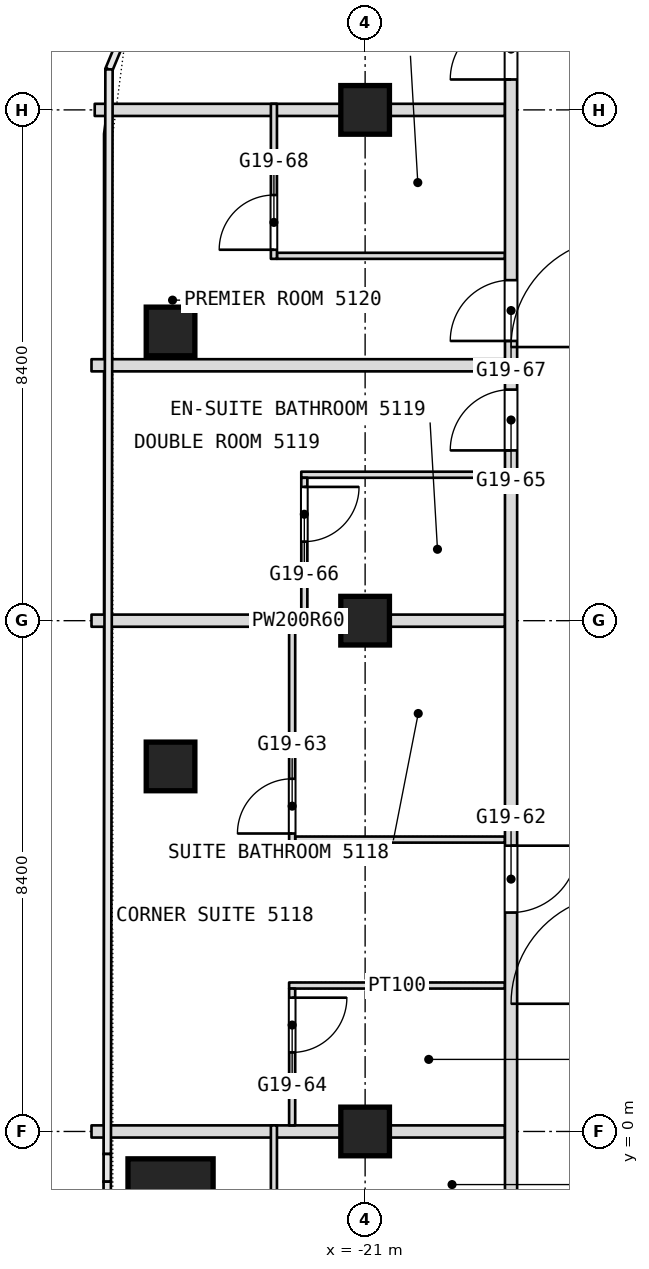
"""IFC4 building model, lengths in metres.
Left out: names, types, materials, properties, quantities, classifications, styles, units other than length and angle.
Written with IfcOpenShell. Run it as: python <this file> out.ifc"""

import sys

from ifc_helpers import new_model, si_unit, direction, frame, frame_2d, origin, origin_2d, place, context, subcontext, project, spatial, rectangle, extrude, element, fill, save


model = new_model("IFC4")
c1 = context("Model", 3, precision=1e-05, world=origin(), true_north=direction((0.0, 1.0)))
c2 = subcontext(c1, "Body", "Model", "MODEL_VIEW")
j1 = project(units=[si_unit("LENGTHUNIT", "METRE"), si_unit("PLANEANGLEUNIT", "RADIAN")], contexts=[c1])
p1 = place(None, origin())
s1 = spatial("IfcSite", under=j1, at=p1, CompositionType="ELEMENT")
p2 = place(p1, origin())
s2 = spatial("IfcBuilding", under=s1, at=p2, CompositionType="ELEMENT")
p3 = place(p2, frame((0.0, 0.0, 220.1)))
s3 = spatial("IfcBuildingStorey", under=s2, at=p3, CompositionType="ELEMENT", Elevation=220.1)
p4 = place(p3, frame((-24.2, -1.15, 0.0), z_axis=(0.0, 0.0, 1.0), x_axis=(1.0, 0.0, 0.0)))
e1 = element("IfcColumn", 1, at=p4, inside=s3, PredefinedType="COLUMN", context=c2, shape_type="SweptSolid", body=[
    extrude(rectangle(XDim=1.4, YDim=1.4, at=origin_2d()), origin(), (0.0, 0.0, 1.0), 3.6),
])
for number, where, z_axis, x_axis in (
    (2, (-21.0, 0.0, 0.0), (0.0, 0.0, 1.0), (1.0, 0.0, 0.0)),
    (3, (-21.0, 8.4, 0.0), (0.0, 0.0, 1.0), (1.0, 0.0, 0.0)),
    (4, (-21.0, 16.8, 0.0), (0.0, 0.0, 1.0), (1.0, 0.0, 0.0)),
    (5, (-24.2, 6.003, 0.0), (0.0, 0.0, 1.0), (1.0, 0.0, 0.0)),
    (6, (-24.2, 13.156, 0.0), (0.0, 0.0, 1.0), (1.0, 0.0, 0.0)),
):
    element("IfcColumn", number, at=place(p3, frame(where, z_axis=z_axis, x_axis=x_axis)), inside=s3, PredefinedType="COLUMN", context=c2, shape_type="SweptSolid", body=[
        extrude(rectangle(XDim=0.8, YDim=0.8, at=origin_2d()), origin(), (0.0, 0.0, 1.0), 3.6),
    ])
p5 = place(p3, frame((-25.5, 0.0, 0.0), z_axis=(0.0, 0.0, 1.0), x_axis=(1.0, 0.0, 0.0)))
e7 = element("IfcWall", 7, at=p5, inside=s3, PredefinedType="PARTITIONING", context=c2, shape_type="SweptSolid", body=[
    extrude(rectangle(XDim=6.8, YDim=0.2, at=frame_2d((3.4, 0.0))), origin(), (0.0, 0.0, 1.0), 2.94),
])
p6 = place(p3, frame((-22.25, 2.4, 0.0), z_axis=(0.0, 0.0, 1.0), x_axis=(1.0, 0.0, 0.0)))
e8 = element("IfcWall", 8, at=p6, inside=s3, PredefinedType="PARTITIONING", context=c2, shape_type="SweptSolid", body=[
    extrude(rectangle(XDim=3.55, YDim=0.1, at=frame_2d((1.775, 0.0))), origin(), (0.0, 0.0, 1.0), 3.34),
])
p7 = place(p3, frame((-22.15, 4.8, 0.0), z_axis=(0.0, 0.0, 1.0), x_axis=(1.0, 0.0, 0.0)))
e9 = element("IfcWall", 9, at=p7, inside=s3, PredefinedType="PARTITIONING", context=c2, shape_type="SweptSolid", body=[
    extrude(rectangle(XDim=3.45, YDim=0.1, at=frame_2d((1.725, 0.0))), origin(), (0.0, 0.0, 1.0), 3.34),
])
p8 = place(p3, frame((-25.5, 8.4, 0.0), z_axis=(0.0, 0.0, 1.0), x_axis=(1.0, 0.0, 0.0)))
e10 = element("IfcWall", 10, at=p8, inside=s3, PredefinedType="PARTITIONING", context=c2, shape_type="SweptSolid", body=[
    extrude(rectangle(XDim=6.8, YDim=0.2, at=frame_2d((3.4, 0.0))), origin(), (0.0, 0.0, 1.0), 2.94),
])
p9 = place(p3, frame((-22.05, 10.8, 0.0), z_axis=(0.0, 0.0, 1.0), x_axis=(1.0, 0.0, 0.0)))
e11 = element("IfcWall", 11, at=p9, inside=s3, PredefinedType="PARTITIONING", context=c2, shape_type="SweptSolid", body=[
    extrude(rectangle(XDim=3.35, YDim=0.1, at=frame_2d((1.675, 0.0))), origin(), (0.0, 0.0, 1.0), 3.34),
])
p10 = place(p3, frame((-25.5, 12.6, 0.0), z_axis=(0.0, 0.0, 1.0), x_axis=(1.0, 0.0, 0.0)))
e12 = element("IfcWall", 12, at=p10, inside=s3, PredefinedType="PARTITIONING", context=c2, shape_type="SweptSolid", body=[
    extrude(rectangle(XDim=6.8, YDim=0.2, at=frame_2d((3.4, 0.0))), origin(), (0.0, 0.0, 1.0), 3.34),
])
p11 = place(p3, frame((-22.45, 14.4, 0.0), z_axis=(0.0, 0.0, 1.0), x_axis=(1.0, 0.0, 0.0)))
e13 = element("IfcWall", 13, at=p11, inside=s3, PredefinedType="PARTITIONING", context=c2, shape_type="SweptSolid", body=[
    extrude(rectangle(XDim=3.75, YDim=0.1, at=frame_2d((1.875, 0.0))), origin(), (0.0, 0.0, 1.0), 3.34),
])
p12 = place(p3, frame((-25.447, 16.8, 0.0), z_axis=(0.0, 0.0, 1.0), x_axis=(1.0, 0.0, 0.0)))
e14 = element("IfcWall", 14, at=p12, inside=s3, PredefinedType="PARTITIONING", context=c2, shape_type="SweptSolid", body=[
    extrude(rectangle(XDim=6.747, YDim=0.2, at=frame_2d((3.374, 0.0))), origin(), (0.0, 0.0, 1.0), 2.94),
])
p13 = place(p3, frame((-18.6, -26.751, 0.0), z_axis=(0.0, 0.0, 1.0), x_axis=(0.0, 1.0, 0.0)))
e15 = element("IfcWall", 15, at=p13, inside=s3, PredefinedType="PARTITIONING", context=c2, shape_type="SweptSolid", body=[
    extrude(rectangle(XDim=49.091, YDim=0.2, at=frame_2d((24.545, 0.0))), origin(), (0.0, 0.0, 1.0), 3.34),
])
p14 = place(p13, frame((3.413, 0.0, 0.0)))
e16 = element("IfcOpeningElement", 16, at=p14, cuts=e15, PredefinedType="OPENING", context=c2, shape_type="SweptSolid", body=[
    extrude(rectangle(XDim=1.0, YDim=2.1, at=frame_2d((0.5, 1.05))), frame((0.0, 0.1, 0.0), z_axis=(0.0, -1.0, 0.0), x_axis=(1.0, 0.0, 0.0)), (0.0, 0.0, 1.0), 0.2),
])
p15 = place(p13, frame((5.838, 0.0, 0.0)))
e17 = element("IfcOpeningElement", 17, at=p15, cuts=e15, PredefinedType="OPENING", context=c2, shape_type="SweptSolid", body=[
    extrude(rectangle(XDim=1.0, YDim=2.1, at=frame_2d((0.5, 1.05))), frame((0.0, 0.1, 0.0), z_axis=(0.0, -1.0, 0.0), x_axis=(1.0, 0.0, 0.0)), (0.0, 0.0, 1.0), 0.2),
])
p16 = place(p13, frame((10.351, 0.0, 0.0)))
e18 = element("IfcOpeningElement", 18, at=p16, cuts=e15, PredefinedType="OPENING", context=c2, shape_type="SweptSolid", body=[
    extrude(rectangle(XDim=1.0, YDim=2.1, at=frame_2d((0.5, 1.05))), frame((0.0, 0.1, 0.0), z_axis=(0.0, -1.0, 0.0), x_axis=(1.0, 0.0, 0.0)), (0.0, 0.0, 1.0), 0.2),
])
p17 = place(p13, frame((16.951, 0.0, 0.0)))
e19 = element("IfcOpeningElement", 19, at=p17, cuts=e15, PredefinedType="OPENING", context=c2, shape_type="SweptSolid", body=[
    extrude(rectangle(XDim=1.0, YDim=2.1, at=frame_2d((0.5, 1.05))), frame((0.0, 0.1, 0.0), z_axis=(0.0, -1.0, 0.0), x_axis=(1.0, 0.0, 0.0)), (0.0, 0.0, 1.0), 0.2),
])
p18 = place(p13, frame((21.151, 0.0, 0.0)))
e20 = element("IfcOpeningElement", 20, at=p18, cuts=e15, PredefinedType="OPENING", context=c2, shape_type="SweptSolid", body=[
    extrude(rectangle(XDim=1.0, YDim=2.1, at=frame_2d((0.5, 1.05))), frame((0.0, 0.1, 0.0), z_axis=(0.0, -1.0, 0.0), x_axis=(1.0, 0.0, 0.0)), (0.0, 0.0, 1.0), 0.2),
])
p19 = place(p13, frame((22.951, 0.0, 0.0)))
e21 = element("IfcOpeningElement", 21, at=p19, cuts=e15, PredefinedType="OPENING", context=c2, shape_type="SweptSolid", body=[
    extrude(rectangle(XDim=1.0, YDim=2.1, at=frame_2d((0.5, 1.05))), frame((0.0, 0.1, 0.0), z_axis=(0.0, -1.0, 0.0), x_axis=(1.0, 0.0, 0.0)), (0.0, 0.0, 1.0), 0.2),
])
p20 = place(p13, frame((30.351, 0.0, 0.0)))
e22 = element("IfcOpeningElement", 22, at=p20, cuts=e15, PredefinedType="OPENING", context=c2, shape_type="SweptSolid", body=[
    extrude(rectangle(XDim=1.1, YDim=2.1, at=frame_2d((0.55, 1.05))), frame((0.0, 0.1, 0.0), z_axis=(0.0, -1.0, 0.0), x_axis=(1.0, 0.0, 0.0)), (0.0, 0.0, 1.0), 0.2),
])
p21 = place(p13, frame((37.951, 0.0, 0.0)))
e23 = element("IfcOpeningElement", 23, at=p21, cuts=e15, PredefinedType="OPENING", context=c2, shape_type="SweptSolid", body=[
    extrude(rectangle(XDim=1.0, YDim=2.1, at=frame_2d((0.5, 1.05))), frame((0.0, 0.1, 0.0), z_axis=(0.0, -1.0, 0.0), x_axis=(1.0, 0.0, 0.0)), (0.0, 0.0, 1.0), 0.2),
])
p22 = place(p13, frame((39.751, 0.0, 0.0)))
e24 = element("IfcOpeningElement", 24, at=p22, cuts=e15, PredefinedType="OPENING", context=c2, shape_type="SweptSolid", body=[
    extrude(rectangle(XDim=1.0, YDim=2.1, at=frame_2d((0.5, 1.05))), frame((0.0, 0.1, 0.0), z_axis=(0.0, -1.0, 0.0), x_axis=(1.0, 0.0, 0.0)), (0.0, 0.0, 1.0), 0.2),
])
p23 = place(p13, frame((44.051, 0.0, 0.0)))
e25 = element("IfcOpeningElement", 25, at=p23, cuts=e15, PredefinedType="OPENING", context=c2, shape_type="SweptSolid", body=[
    extrude(rectangle(XDim=1.0, YDim=2.1, at=frame_2d((0.5, 1.05))), frame((0.0, 0.1, 0.0), z_axis=(0.0, -1.0, 0.0), x_axis=(1.0, 0.0, 0.0)), (0.0, 0.0, 1.0), 0.2),
])
p24 = place(p3, frame((-22.0, 8.5, 0.0), z_axis=(0.0, 0.0, 1.0), x_axis=(0.0, 1.0, 0.0)))
e26 = element("IfcWall", 26, at=p24, inside=s3, PredefinedType="PARTITIONING", context=c2, shape_type="SweptSolid", body=[
    extrude(rectangle(XDim=2.25, YDim=0.1, at=frame_2d((1.125, 0.0))), origin(), (0.0, 0.0, 1.0), 3.34),
])
p25 = place(p24, frame((1.2, 0.0, 0.0)))
e27 = element("IfcOpeningElement", 27, at=p25, cuts=e26, PredefinedType="OPENING", context=c2, shape_type="SweptSolid", body=[
    extrude(rectangle(XDim=0.9, YDim=2.1, at=frame_2d((0.45, 1.05))), frame((0.0, 0.05, 0.0), z_axis=(0.0, -1.0, 0.0), x_axis=(1.0, 0.0, 0.0)), (0.0, 0.0, 1.0), 0.1),
])
p26 = place(p3, frame((-22.2, 0.1, 0.0), z_axis=(0.0, 0.0, 1.0), x_axis=(0.0, 1.0, 0.0)))
e28 = element("IfcWall", 28, at=p26, inside=s3, PredefinedType="PARTITIONING", context=c2, shape_type="SweptSolid", body=[
    extrude(rectangle(XDim=2.25, YDim=0.1, at=frame_2d((1.125, 0.0))), origin(), (0.0, 0.0, 1.0), 3.34),
])
p27 = place(p26, frame((1.2, 0.0, 0.0)))
e29 = element("IfcOpeningElement", 29, at=p27, cuts=e28, PredefinedType="OPENING", context=c2, shape_type="SweptSolid", body=[
    extrude(rectangle(XDim=0.9, YDim=2.1, at=frame_2d((0.45, 1.05))), frame((0.0, 0.05, 0.0), z_axis=(0.0, -1.0, 0.0), x_axis=(1.0, 0.0, 0.0)), (0.0, 0.0, 1.0), 0.1),
])
p28 = place(p3, frame((-22.2, 4.75, 0.0), z_axis=(0.0, 0.0, 1.0), x_axis=(0.0, 1.0, 0.0)))
e30 = element("IfcWall", 30, at=p28, inside=s3, PredefinedType="PARTITIONING", context=c2, shape_type="SweptSolid", body=[
    extrude(rectangle(XDim=3.75, YDim=0.1, at=frame_2d((1.875, 0.0))), origin(), (0.0, 0.0, 1.0), 3.34),
])
p29 = place(p28, frame((0.15, 0.0, 0.0)))
e31 = element("IfcOpeningElement", 31, at=p29, cuts=e30, PredefinedType="OPENING", context=c2, shape_type="SweptSolid", body=[
    extrude(rectangle(XDim=0.9, YDim=2.1, at=frame_2d((0.45, 1.05))), frame((0.0, 0.05, 0.0), z_axis=(0.0, -1.0, 0.0), x_axis=(1.0, 0.0, 0.0)), (0.0, 0.0, 1.0), 0.1),
])
p30 = place(p3, frame((-22.5, -2.45, 0.0), z_axis=(0.0, 0.0, 1.0), x_axis=(0.0, 1.0, 0.0)))
e32 = element("IfcWall", 32, at=p30, inside=s3, PredefinedType="PARTITIONING", context=c2, shape_type="SweptSolid", body=[
    extrude(rectangle(XDim=2.55, YDim=0.1, at=frame_2d((1.275, 0.0))), origin(), (0.0, 0.0, 1.0), 3.34),
])
p31 = place(p3, frame((-22.5, 14.35, 0.0), z_axis=(0.0, 0.0, 1.0), x_axis=(0.0, 1.0, 0.0)))
e33 = element("IfcWall", 33, at=p31, inside=s3, PredefinedType="PARTITIONING", context=c2, shape_type="SweptSolid", body=[
    extrude(rectangle(XDim=2.55, YDim=0.1, at=frame_2d((1.275, 0.0))), origin(), (0.0, 0.0, 1.0), 3.34),
])
p32 = place(p31, frame((0.15, 0.0, 0.0)))
e34 = element("IfcOpeningElement", 34, at=p32, cuts=e33, PredefinedType="OPENING", context=c2, shape_type="SweptSolid", body=[
    extrude(rectangle(XDim=0.9, YDim=2.1, at=frame_2d((0.45, 1.05))), frame((0.0, 0.05, 0.0), z_axis=(0.0, -1.0, 0.0), x_axis=(1.0, 0.0, 0.0)), (0.0, 0.0, 1.0), 0.1),
])
p33 = place(p20, origin())
e35 = element("IfcDoor", 35, at=p33, inside=s3, OperationType="SINGLE_SWING_RIGHT", PredefinedType="DOOR", context=c2, shape_type="SweptSolid", body=[
    extrude(rectangle(XDim=1.1, YDim=2.1, at=frame_2d((0.55, 1.05))), frame((0.0, 0.025, 0.0), z_axis=(0.0, -1.0, 0.0), x_axis=(1.0, 0.0, 0.0)), (0.0, 0.0, 1.0), 0.05),
])
fill(e22, e35)
p34 = place(p21, origin())
e36 = element("IfcDoor", 36, at=p34, inside=s3, OperationType="SINGLE_SWING_RIGHT", PredefinedType="DOOR", context=c2, shape_type="SweptSolid", body=[
    extrude(rectangle(XDim=1.0, YDim=2.1, at=frame_2d((0.5, 1.05))), frame((0.0, 0.025, 0.0), z_axis=(0.0, -1.0, 0.0), x_axis=(1.0, 0.0, 0.0)), (0.0, 0.0, 1.0), 0.05),
])
fill(e23, e36)
p35 = place(p22, origin())
e37 = element("IfcDoor", 37, at=p35, inside=s3, OperationType="SINGLE_SWING_RIGHT", PredefinedType="DOOR", context=c2, shape_type="SweptSolid", body=[
    extrude(rectangle(XDim=1.0, YDim=2.1, at=frame_2d((0.5, 1.05))), frame((0.0, 0.025, 0.0), z_axis=(0.0, -1.0, 0.0), x_axis=(1.0, 0.0, 0.0)), (0.0, 0.0, 1.0), 0.05),
])
fill(e24, e37)
p36 = place(p23, origin())
e38 = element("IfcDoor", 38, at=p36, inside=s3, OperationType="SINGLE_SWING_RIGHT", PredefinedType="DOOR", context=c2, shape_type="SweptSolid", body=[
    extrude(rectangle(XDim=1.0, YDim=2.1, at=frame_2d((0.5, 1.05))), frame((0.0, 0.025, 0.0), z_axis=(0.0, -1.0, 0.0), x_axis=(1.0, 0.0, 0.0)), (0.0, 0.0, 1.0), 0.05),
])
fill(e25, e38)
p37 = place(p25, origin())
e39 = element("IfcDoor", 39, at=p37, inside=s3, OperationType="SINGLE_SWING_LEFT", PredefinedType="DOOR", context=c2, shape_type="SweptSolid", body=[
    extrude(rectangle(XDim=0.9, YDim=2.1, at=frame_2d((0.45, 1.05))), frame((0.0, 0.025, 0.0), z_axis=(0.0, -1.0, 0.0), x_axis=(1.0, 0.0, 0.0)), (0.0, 0.0, 1.0), 0.05),
])
fill(e27, e39)
p38 = place(p27, origin())
e40 = element("IfcDoor", 40, at=p38, inside=s3, OperationType="SINGLE_SWING_LEFT", PredefinedType="DOOR", context=c2, shape_type="SweptSolid", body=[
    extrude(rectangle(XDim=0.9, YDim=2.1, at=frame_2d((0.45, 1.05))), frame((0.0, 0.025, 0.0), z_axis=(0.0, -1.0, 0.0), x_axis=(1.0, 0.0, 0.0)), (0.0, 0.0, 1.0), 0.05),
])
fill(e29, e40)
p39 = place(p29, origin())
e41 = element("IfcDoor", 41, at=p39, inside=s3, OperationType="SINGLE_SWING_RIGHT", PredefinedType="DOOR", context=c2, shape_type="SweptSolid", body=[
    extrude(rectangle(XDim=0.9, YDim=2.1, at=frame_2d((0.45, 1.05))), frame((0.0, 0.025, 0.0), z_axis=(0.0, -1.0, 0.0), x_axis=(1.0, 0.0, 0.0)), (0.0, 0.0, 1.0), 0.05),
])
fill(e31, e41)
p40 = place(p32, origin())
e42 = element("IfcDoor", 42, at=p40, inside=s3, OperationType="SINGLE_SWING_RIGHT", PredefinedType="DOOR", context=c2, shape_type="SweptSolid", body=[
    extrude(rectangle(XDim=0.9, YDim=2.1, at=frame_2d((0.45, 1.05))), frame((0.0, 0.025, 0.0), z_axis=(0.0, -1.0, 0.0), x_axis=(1.0, 0.0, 0.0)), (0.0, 0.0, 1.0), 0.05),
])
fill(e34, e42)
save(model, sys.argv[1])
